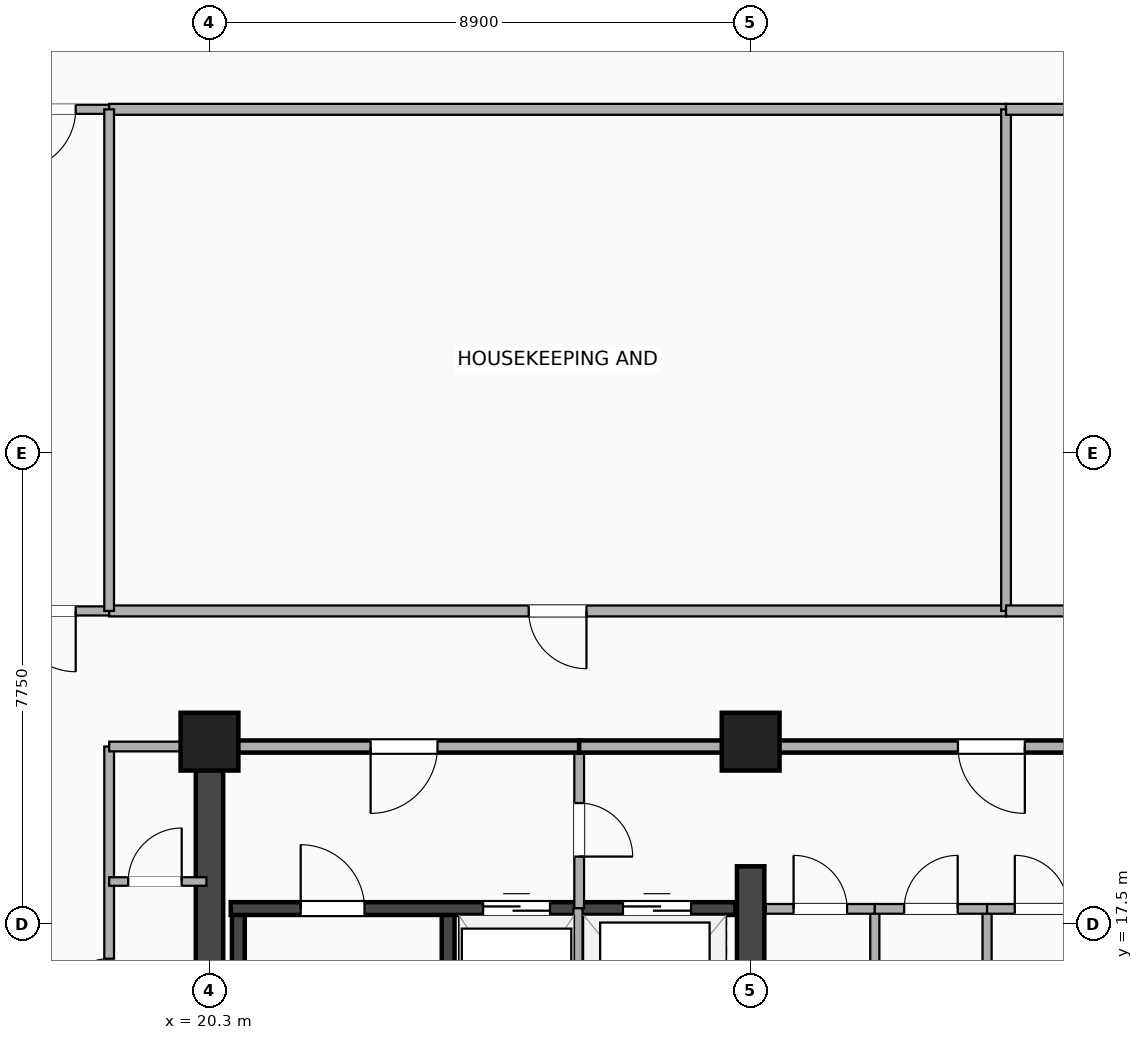
"""IFC4 building model, lengths in metres.
Left out: names, types, materials, properties, quantities, classifications, styles, units other than length and angle.
Written with IfcOpenShell. Run it as: python <this file> out.ifc"""

import sys

from ifc_helpers import new_model, si_unit, direction, frame, frame_2d, origin, origin_2d, place, context, subcontext, project, spatial, rectangle, extrude, element, fill, save


model = new_model("IFC4")
c1 = context("Model", 3, precision=1e-05, world=origin(), true_north=direction((0.0, 1.0)))
c2 = subcontext(c1, "Body", "Model", "MODEL_VIEW")
j1 = project(units=[si_unit("LENGTHUNIT", "METRE"), si_unit("PLANEANGLEUNIT", "RADIAN")], contexts=[c1])
p1 = place(None, origin())
s1 = spatial("IfcSite", under=j1, at=p1, CompositionType="ELEMENT")
p2 = place(p1, origin())
s2 = spatial("IfcBuilding", under=s1, at=p2, CompositionType="ELEMENT")
p3 = place(p2, frame((0.0, 0.0, 224.9)))
s3 = spatial("IfcBuildingStorey", under=s2, at=p3, CompositionType="ELEMENT", Elevation=224.9)
p4 = place(p3, frame((20.3, 3.5, 0.0), z_axis=(0.0, 0.0, 1.0), x_axis=(0.0, 1.0, 0.0)))
e1 = element("IfcWall", 1, at=p4, inside=s3, PredefinedType="SHEAR", context=c2, shape_type="SweptSolid", body=[
    extrude(rectangle(XDim=16.9, YDim=0.45, at=frame_2d((8.45, 0.0))), origin(), (0.0, 0.0, 1.0), 3.26),
])
p5 = place(p3, frame((29.2, 3.5, 0.0), z_axis=(0.0, 0.0, 1.0), x_axis=(0.0, 1.0, 0.0)))
e2 = element("IfcWall", 2, at=p5, inside=s3, PredefinedType="SHEAR", context=c2, shape_type="SweptSolid", body=[
    extrude(rectangle(XDim=14.95, YDim=0.45, at=frame_2d((7.475, 0.0))), origin(), (0.0, 0.0, 1.0), 3.26),
])
p6 = place(p5, frame((7.75, 0.0, 0.0), z_axis=(0.0, 0.0, 1.0), x_axis=(-1.0, 0.0, 0.0)))
e3 = element("IfcOpeningElement", 3, at=p6, cuts=e2, PredefinedType="OPENING", context=c2, shape_type="SweptSolid", body=[
    extrude(rectangle(XDim=1.1, YDim=2.15, at=frame_2d((0.55, 1.075))), frame((0.0, 0.235, 0.0), z_axis=(0.0, -1.0, 0.0), x_axis=(1.0, 0.0, 0.0)), (0.0, 0.0, 1.0), 0.47),
])
for number, where, z_axis, x_axis in (
    (4, (20.775, 9.745, 0.0), (0.0, 0.0, 1.0), (0.0, 1.0, 0.0)),
    (5, (24.225, 9.745, 0.0), (0.0, 0.0, 1.0), (0.0, 1.0, 0.0)),
):
    element("IfcWall", number, at=place(p3, frame(where, z_axis=z_axis, x_axis=x_axis)), inside=s3, PredefinedType="SHEAR", context=c2, shape_type="SweptSolid", body=[
        extrude(rectangle(XDim=8.01, YDim=0.21, at=frame_2d((4.005, 0.0))), origin(), (0.0, 0.0, 1.0), 3.26),
    ])
p7 = place(p3, frame((20.65, 17.755, 0.0), z_axis=(0.0, 0.0, 1.0), x_axis=(1.0, 0.0, 0.0)))
e6 = element("IfcWall", 6, at=p7, inside=s3, PredefinedType="SHEAR", context=c2, shape_type="SweptSolid", body=[
    extrude(rectangle(XDim=8.3, YDim=0.21, at=frame_2d((4.15, 0.0))), origin(), (0.0, 0.0, 1.0), 3.26),
])
p8 = place(p7, frame((2.2, 0.0, 0.0), z_axis=(0.0, 0.0, 1.0), x_axis=(-1.0, 0.0, 0.0)))
e7 = element("IfcOpeningElement", 7, at=p8, cuts=e6, PredefinedType="OPENING", context=c2, shape_type="SweptSolid", body=[
    extrude(rectangle(XDim=1.05, YDim=2.15, at=frame_2d((0.525, 1.075))), frame((0.0, 0.115, 0.0), z_axis=(0.0, -1.0, 0.0), x_axis=(1.0, 0.0, 0.0)), (0.0, 0.0, 1.0), 0.23),
])
p9 = place(p7, frame((4.15, 0.0, 0.0)))
e8 = element("IfcOpeningElement", 8, at=p9, cuts=e6, PredefinedType="OPENING", context=c2, shape_type="SweptSolid", body=[
    extrude(rectangle(XDim=1.1, YDim=2.18, at=frame_2d((0.55, 1.09))), frame((0.0, 0.115, 0.0), z_axis=(0.0, -1.0, 0.0), x_axis=(1.0, 0.0, 0.0)), (0.0, 0.0, 1.0), 0.23),
])
p10 = place(p7, frame((6.45, 0.0, 0.0)))
e9 = element("IfcOpeningElement", 9, at=p10, cuts=e6, PredefinedType="OPENING", context=c2, shape_type="SweptSolid", body=[
    extrude(rectangle(XDim=1.12, YDim=2.2, at=frame_2d((0.56, 1.1))), frame((0.0, 0.115, 0.0), z_axis=(0.0, -1.0, 0.0), x_axis=(1.0, 0.0, 0.0)), (0.0, 0.0, 1.0), 0.23),
])
for number, where, z_axis, x_axis in (
    (10, (20.3, 20.5, -0.24), (0.0, 0.0, 1.0), (1.0, 0.0, 0.0)),
    (11, (29.2, 20.5, -0.24), (0.0, 0.0, 1.0), (1.0, 0.0, 0.0)),
):
    element("IfcColumn", number, at=place(p3, frame(where, z_axis=z_axis, x_axis=x_axis)), inside=s3, PredefinedType="COLUMN", context=c2, shape_type="SweptSolid", body=[
        extrude(rectangle(XDim=0.95, YDim=0.95, at=origin_2d()), origin(), (0.0, 0.0, 1.0), 3.5),
    ])
p11 = place(p3, frame((26.38, 17.76, 0.0), z_axis=(0.0, 0.0, 1.0), x_axis=(0.0, 1.0, 0.0)))
e12 = element("IfcWall", 12, at=p11, inside=s3, PredefinedType="PARTITIONING", context=c2, shape_type="SweptSolid", body=[
    extrude(rectangle(XDim=2.66, YDim=0.16, at=frame_2d((1.33, 0.0))), origin(), (0.0, 0.0, 1.0), 2.706),
])
p12 = place(p11, frame((0.85, 0.0, 0.0)))
e13 = element("IfcOpeningElement", 13, at=p12, cuts=e12, PredefinedType="OPENING", context=c2, shape_type="SweptSolid", body=[
    extrude(rectangle(XDim=0.88, YDim=2.08, at=frame_2d((0.44, 1.04))), frame((0.0, 0.09, 0.0), z_axis=(0.0, -1.0, 0.0), x_axis=(1.0, 0.0, 0.0)), (0.0, 0.0, 1.0), 0.18),
])
p13 = place(p3, frame((26.36, 14.72, 0.0), z_axis=(0.0, 0.0, 1.0), x_axis=(0.0, 1.0, 0.0)))
e14 = element("IfcWall", 14, at=p13, inside=s3, PredefinedType="PARTITIONING", context=c2, shape_type="SweptSolid", body=[
    extrude(rectangle(XDim=3.04, YDim=0.15, at=frame_2d((1.52, 0.0))), origin(), (0.0, 0.0, 1.0), 3.26),
])
p14 = place(p3, frame((20.65, 20.42, 0.0), z_axis=(0.0, 0.0, 1.0), x_axis=(1.0, 0.0, 0.0)))
e15 = element("IfcWall", 15, at=p14, inside=s3, PredefinedType="PARTITIONING", context=c2, shape_type="SweptSolid", body=[
    extrude(rectangle(XDim=5.73, YDim=0.2, at=frame_2d((2.865, 0.0))), origin(), (0.0, 0.0, 1.0), 2.472),
])
p15 = place(p14, frame((2.3, 0.0, 0.0)))
e16 = element("IfcOpeningElement", 16, at=p15, cuts=e15, PredefinedType="OPENING", context=c2, shape_type="SweptSolid", body=[
    extrude(rectangle(XDim=1.1, YDim=2.15, at=frame_2d((0.55, 1.075))), frame((0.0, 0.11, 0.0), z_axis=(0.0, -1.0, 0.0), x_axis=(1.0, 0.0, 0.0)), (0.0, 0.0, 1.0), 0.22),
])
p16 = place(p3, frame((26.38, 20.42, 0.0), z_axis=(0.0, 0.0, 1.0), x_axis=(1.0, 0.0, 0.0)))
e17 = element("IfcWall", 17, at=p16, inside=s3, PredefinedType="PARTITIONING", context=c2, shape_type="SweptSolid", body=[
    extrude(rectangle(XDim=2.82, YDim=0.2, at=frame_2d((1.41, 0.0))), origin(), (0.0, 0.0, 1.0), 2.472),
])
p17 = place(p3, frame((29.2, 20.42, 0.0), z_axis=(0.0, 0.0, 1.0), x_axis=(1.0, 0.0, 0.0)))
e18 = element("IfcWall", 18, at=p17, inside=s3, PredefinedType="PARTITIONING", context=c2, shape_type="SweptSolid", body=[
    extrude(rectangle(XDim=7.8, YDim=0.2, at=frame_2d((3.9, 0.0))), origin(), (0.0, 0.0, 1.0), 2.472),
])
p18 = place(p17, frame((3.409, 0.0, 0.0)))
e19 = element("IfcOpeningElement", 19, at=p18, cuts=e18, PredefinedType="OPENING", context=c2, shape_type="SweptSolid", body=[
    extrude(rectangle(XDim=1.1, YDim=2.15, at=frame_2d((0.55, 1.075))), frame((0.0, 0.11, 0.0), z_axis=(0.0, -1.0, 0.0), x_axis=(1.0, 0.0, 0.0)), (0.0, 0.0, 1.0), 0.22),
])
p19 = place(p3, frame((31.242, 11.74, 0.0), z_axis=(0.0, 0.0, 1.0), x_axis=(0.0, 1.0, 0.0)))
e20 = element("IfcWall", 20, at=p19, inside=s3, PredefinedType="PARTITIONING", context=c2, shape_type="SweptSolid", body=[
    extrude(rectangle(XDim=6.01, YDim=0.15, at=frame_2d((3.005, 0.0))), origin(), (0.0, 0.0, 1.0), 3.26),
])
p20 = place(p3, frame((29.45, 17.75, 0.0), z_axis=(0.0, 0.0, 1.0), x_axis=(1.0, 0.0, 0.0)))
e21 = element("IfcWall", 21, at=p20, inside=s3, PredefinedType="PARTITIONING", context=c2, shape_type="SweptSolid", body=[
    extrude(rectangle(XDim=1.792, YDim=0.16, at=frame_2d((0.896, 0.0))), origin(), (0.0, 0.0, 1.0), 3.26),
])
p21 = place(p20, frame((1.336, 0.0, 0.0), z_axis=(0.0, 0.0, 1.0), x_axis=(-1.0, 0.0, 0.0)))
e22 = element("IfcOpeningElement", 22, at=p21, cuts=e21, PredefinedType="OPENING", context=c2, shape_type="SweptSolid", body=[
    extrude(rectangle(XDim=0.88, YDim=2.08, at=frame_2d((0.44, 1.04))), frame((0.0, 0.09, 0.0), z_axis=(0.0, -1.0, 0.0), x_axis=(1.0, 0.0, 0.0)), (0.0, 0.0, 1.0), 0.18),
])
p22 = place(p3, frame((33.088, 11.74, 0.0), z_axis=(0.0, 0.0, 1.0), x_axis=(0.0, 1.0, 0.0)))
e23 = element("IfcWall", 23, at=p22, inside=s3, PredefinedType="PARTITIONING", context=c2, shape_type="SweptSolid", body=[
    extrude(rectangle(XDim=6.01, YDim=0.15, at=frame_2d((3.005, 0.0))), origin(), (0.0, 0.0, 1.0), 3.26),
])
p23 = place(p3, frame((31.242, 17.75, 0.0), z_axis=(0.0, 0.0, 1.0), x_axis=(1.0, 0.0, 0.0)))
e24 = element("IfcWall", 24, at=p23, inside=s3, PredefinedType="PARTITIONING", context=c2, shape_type="SweptSolid", body=[
    extrude(rectangle(XDim=1.846, YDim=0.16, at=frame_2d((0.923, 0.0))), origin(), (0.0, 0.0, 1.0), 3.26),
])
p24 = place(p23, frame((1.363, 0.0, 0.0), z_axis=(0.0, 0.0, 1.0), x_axis=(-1.0, 0.0, 0.0)))
e25 = element("IfcOpeningElement", 25, at=p24, cuts=e24, PredefinedType="OPENING", context=c2, shape_type="SweptSolid", body=[
    extrude(rectangle(XDim=0.88, YDim=2.08, at=frame_2d((0.44, 1.04))), frame((0.0, 0.09, 0.0), z_axis=(0.0, -1.0, 0.0), x_axis=(1.0, 0.0, 0.0)), (0.0, 0.0, 1.0), 0.18),
])
p25 = place(p3, frame((33.088, 17.75, 0.0), z_axis=(0.0, 0.0, 1.0), x_axis=(1.0, 0.0, 0.0)))
e26 = element("IfcWall", 26, at=p25, inside=s3, PredefinedType="PARTITIONING", context=c2, shape_type="SweptSolid", body=[
    extrude(rectangle(XDim=1.792, YDim=0.16, at=frame_2d((0.896, 0.0))), origin(), (0.0, 0.0, 1.0), 3.26),
])
p26 = place(p25, frame((1.336, 0.0, 0.0), z_axis=(0.0, 0.0, 1.0), x_axis=(-1.0, 0.0, 0.0)))
e27 = element("IfcOpeningElement", 27, at=p26, cuts=e26, PredefinedType="OPENING", context=c2, shape_type="SweptSolid", body=[
    extrude(rectangle(XDim=0.88, YDim=2.08, at=frame_2d((0.44, 1.04))), frame((0.0, 0.09, 0.0), z_axis=(0.0, -1.0, 0.0), x_axis=(1.0, 0.0, 0.0)), (0.0, 0.0, 1.0), 0.18),
])
p27 = place(p3, frame((18.65, 15.65, 0.0), z_axis=(0.0, 0.0, 1.0), x_axis=(0.0, 1.0, 0.0)))
e28 = element("IfcWall", 28, at=p27, inside=s3, PredefinedType="PARTITIONING", context=c2, shape_type="SweptSolid", body=[
    extrude(rectangle(XDim=4.77, YDim=0.16, at=frame_2d((2.385, 0.0))), origin(), (0.0, 0.0, 1.0), 2.472),
])
p28 = place(p27, frame((1.28, 0.0, 0.0), z_axis=(0.0, 0.0, 1.0), x_axis=(-1.0, 0.0, 0.0)))
e29 = element("IfcOpeningElement", 29, at=p28, cuts=e28, PredefinedType="OPENING", context=c2, shape_type="SweptSolid", body=[
    extrude(rectangle(XDim=0.88, YDim=2.08, at=frame_2d((0.44, 1.04))), frame((0.0, 0.09, 0.0), z_axis=(0.0, -1.0, 0.0), x_axis=(1.0, 0.0, 0.0)), (0.0, 0.0, 1.0), 0.18),
])
p29 = place(p3, frame((18.65, 20.42, 0.0), z_axis=(0.0, 0.0, 1.0), x_axis=(1.0, 0.0, 0.0)))
e30 = element("IfcWall", 30, at=p29, inside=s3, PredefinedType="PARTITIONING", context=c2, shape_type="SweptSolid", body=[
    extrude(rectangle(XDim=1.65, YDim=0.16, at=frame_2d((0.825, 0.0))), origin(), (0.0, 0.0, 1.0), 2.472),
])
p30 = place(p3, frame((16.65, 22.65, 0.0), z_axis=(0.0, 0.0, 1.0), x_axis=(1.0, 0.0, 0.0)))
e31 = element("IfcWall", 31, at=p30, inside=s3, PredefinedType="PARTITIONING", context=c2, shape_type="SweptSolid", body=[
    extrude(rectangle(XDim=2.0, YDim=0.15, at=frame_2d((1.0, 0.0))), origin(), (0.0, 0.0, 1.0), 3.26),
])
p31 = place(p30, frame((0.45, 0.0, 0.0)))
e32 = element("IfcOpeningElement", 32, at=p31, cuts=e31, PredefinedType="OPENING", context=c2, shape_type="SweptSolid", body=[
    extrude(rectangle(XDim=1.0, YDim=2.15, at=frame_2d((0.5, 1.075))), frame((0.0, 0.085, 0.0), z_axis=(0.0, -1.0, 0.0), x_axis=(1.0, 0.0, 0.0)), (0.0, 0.0, 1.0), 0.17),
])
p32 = place(p3, frame((16.65, 30.9, 0.0), z_axis=(0.0, 0.0, 1.0), x_axis=(1.0, 0.0, 0.0)))
e33 = element("IfcWall", 33, at=p32, inside=s3, PredefinedType="PARTITIONING", context=c2, shape_type="SweptSolid", body=[
    extrude(rectangle(XDim=2.0, YDim=0.15, at=frame_2d((1.0, 0.0))), origin(), (0.0, 0.0, 1.0), 3.26),
])
p33 = place(p32, frame((0.45, 0.0, 0.0)))
e34 = element("IfcOpeningElement", 34, at=p33, cuts=e33, PredefinedType="OPENING", context=c2, shape_type="SweptSolid", body=[
    extrude(rectangle(XDim=1.0, YDim=2.15, at=frame_2d((0.5, 1.075))), frame((0.0, 0.085, 0.0), z_axis=(0.0, -1.0, 0.0), x_axis=(1.0, 0.0, 0.0)), (0.0, 0.0, 1.0), 0.17),
])
p34 = place(p3, frame((18.65, 22.65, 0.0), z_axis=(0.0, 0.0, 1.0), x_axis=(1.0, 0.0, 0.0)))
e35 = element("IfcWall", 35, at=p34, inside=s3, PredefinedType="PARTITIONING", context=c2, shape_type="SweptSolid", body=[
    extrude(rectangle(XDim=14.75, YDim=0.18, at=frame_2d((7.375, 0.0))), origin(), (0.0, 0.0, 1.0), 2.472),
])
p35 = place(p34, frame((6.9, 0.0, 0.0)))
e36 = element("IfcOpeningElement", 36, at=p35, cuts=e35, PredefinedType="OPENING", context=c2, shape_type="SweptSolid", body=[
    extrude(rectangle(XDim=0.95, YDim=2.15, at=frame_2d((0.475, 1.075))), frame((0.0, 0.1, 0.0), z_axis=(0.0, -1.0, 0.0), x_axis=(1.0, 0.0, 0.0)), (0.0, 0.0, 1.0), 0.2),
])
p36 = place(p3, frame((18.65, 30.9, 0.0), z_axis=(0.0, 0.0, 1.0), x_axis=(1.0, 0.0, 0.0)))
e37 = element("IfcWall", 37, at=p36, inside=s3, PredefinedType="PARTITIONING", context=c2, shape_type="SweptSolid", body=[
    extrude(rectangle(XDim=14.75, YDim=0.18, at=frame_2d((7.375, 0.0))), origin(), (0.0, 0.0, 1.0), 2.472),
])
for number, where, z_axis, x_axis in (
    (38, (18.65, 22.65, 0.0), (0.0, 0.0, 1.0), (0.0, 1.0, 0.0)),
    (39, (33.4, 22.65, 0.0), (0.0, 0.0, 1.0), (0.0, 1.0, 0.0)),
):
    element("IfcWall", number, at=place(p3, frame(where, z_axis=z_axis, x_axis=x_axis)), inside=s3, PredefinedType="PARTITIONING", context=c2, shape_type="SweptSolid", body=[
        extrude(rectangle(XDim=8.25, YDim=0.16, at=frame_2d((4.125, 0.0))), origin(), (0.0, 0.0, 1.0), 2.887),
    ])
p37 = place(p3, frame((33.4, 22.65, 0.0), z_axis=(0.0, 0.0, 1.0), x_axis=(1.0, 0.0, 0.0)))
e40 = element("IfcWall", 40, at=p37, inside=s3, PredefinedType="PARTITIONING", context=c2, shape_type="SweptSolid", body=[
    extrude(rectangle(XDim=5.7, YDim=0.18, at=frame_2d((2.85, 0.0))), origin(), (0.0, 0.0, 1.0), 2.472),
])
p38 = place(p37, frame((2.375, 0.0, 0.0)))
e41 = element("IfcOpeningElement", 41, at=p38, cuts=e40, PredefinedType="OPENING", context=c2, shape_type="SweptSolid", body=[
    extrude(rectangle(XDim=0.95, YDim=2.15, at=frame_2d((0.475, 1.075))), frame((0.0, 0.1, 0.0), z_axis=(0.0, -1.0, 0.0), x_axis=(1.0, 0.0, 0.0)), (0.0, 0.0, 1.0), 0.2),
])
p39 = place(p3, frame((33.4, 30.9, 0.0), z_axis=(0.0, 0.0, 1.0), x_axis=(1.0, 0.0, 0.0)))
e42 = element("IfcWall", 42, at=p39, inside=s3, PredefinedType="PARTITIONING", context=c2, shape_type="SweptSolid", body=[
    extrude(rectangle(XDim=5.7, YDim=0.18, at=frame_2d((2.85, 0.0))), origin(), (0.0, 0.0, 1.0), 2.472),
])
p40 = place(p3, frame((18.65, 18.2, 0.0), z_axis=(0.0, 0.0, 1.0), x_axis=(1.0, 0.0, 0.0)))
e43 = element("IfcWall", 43, at=p40, inside=s3, PredefinedType="PARTITIONING", context=c2, shape_type="SweptSolid", body=[
    extrude(rectangle(XDim=1.6, YDim=0.14, at=frame_2d((0.8, 0.0))), origin(), (0.0, 0.0, 1.0), 2.472),
])
p41 = place(p40, frame((1.193, 0.0, 0.0), z_axis=(0.0, 0.0, 1.0), x_axis=(-1.0, 0.0, 0.0)))
e44 = element("IfcOpeningElement", 44, at=p41, cuts=e43, PredefinedType="OPENING", context=c2, shape_type="SweptSolid", body=[
    extrude(rectangle(XDim=0.88, YDim=2.08, at=frame_2d((0.44, 1.04))), frame((0.0, 0.08, 0.0), z_axis=(0.0, -1.0, 0.0), x_axis=(1.0, 0.0, 0.0)), (0.0, 0.0, 1.0), 0.16),
])
p42 = place(p8, origin())
e45 = element("IfcDoor", 45, at=p42, inside=s3, OperationType="SINGLE_SWING_LEFT", PredefinedType="DOOR", context=c2, shape_type="SweptSolid", body=[
    extrude(rectangle(XDim=1.05, YDim=2.15, at=frame_2d((0.525, 1.075))), frame((0.0, 0.025, 0.0), z_axis=(0.0, -1.0, 0.0), x_axis=(1.0, 0.0, 0.0)), (0.0, 0.0, 1.0), 0.05),
])
fill(e7, e45)
p43 = place(p9, origin())
e46 = element("IfcDoor", 46, at=p43, inside=s3, OperationType="DOUBLE_DOOR_SLIDING", PredefinedType="DOOR", context=c2, shape_type="SweptSolid", body=[
    extrude(rectangle(XDim=1.1, YDim=2.18, at=frame_2d((0.55, 1.09))), frame((0.0, 0.025, 0.0), z_axis=(0.0, -1.0, 0.0), x_axis=(1.0, 0.0, 0.0)), (0.0, 0.0, 1.0), 0.05),
])
fill(e8, e46)
p44 = place(p10, origin())
e47 = element("IfcDoor", 47, at=p44, inside=s3, OperationType="DOUBLE_DOOR_SLIDING", PredefinedType="DOOR", context=c2, shape_type="SweptSolid", body=[
    extrude(rectangle(XDim=1.12, YDim=2.2, at=frame_2d((0.56, 1.1))), frame((0.0, 0.025, 0.0), z_axis=(0.0, -1.0, 0.0), x_axis=(1.0, 0.0, 0.0)), (0.0, 0.0, 1.0), 0.05),
])
fill(e9, e47)
p45 = place(p12, origin())
e48 = element("IfcDoor", 48, at=p45, inside=s3, OperationType="SINGLE_SWING_LEFT", PredefinedType="DOOR", context=c2, shape_type="SweptSolid", body=[
    extrude(rectangle(XDim=0.88, YDim=2.08, at=frame_2d((0.44, 1.04))), frame((0.0, 0.025, 0.0), z_axis=(0.0, -1.0, 0.0), x_axis=(1.0, 0.0, 0.0)), (0.0, 0.0, 1.0), 0.05),
])
fill(e13, e48)
p46 = place(p15, origin())
e49 = element("IfcDoor", 49, at=p46, inside=s3, OperationType="SINGLE_SWING_LEFT", PredefinedType="DOOR", context=c2, shape_type="SweptSolid", body=[
    extrude(rectangle(XDim=1.1, YDim=2.15, at=frame_2d((0.55, 1.075))), frame((0.0, 0.025, 0.0), z_axis=(0.0, -1.0, 0.0), x_axis=(1.0, 0.0, 0.0)), (0.0, 0.0, 1.0), 0.05),
])
fill(e16, e49)
p47 = place(p18, origin())
e50 = element("IfcDoor", 50, at=p47, inside=s3, OperationType="SINGLE_SWING_RIGHT", PredefinedType="DOOR", context=c2, shape_type="SweptSolid", body=[
    extrude(rectangle(XDim=1.1, YDim=2.15, at=frame_2d((0.55, 1.075))), frame((0.0, 0.025, 0.0), z_axis=(0.0, -1.0, 0.0), x_axis=(1.0, 0.0, 0.0)), (0.0, 0.0, 1.0), 0.05),
])
fill(e19, e50)
p48 = place(p21, origin())
e51 = element("IfcDoor", 51, at=p48, inside=s3, OperationType="SINGLE_SWING_LEFT", PredefinedType="DOOR", context=c2, shape_type="SweptSolid", body=[
    extrude(rectangle(XDim=0.88, YDim=2.08, at=frame_2d((0.44, 1.04))), frame((0.0, 0.025, 0.0), z_axis=(0.0, -1.0, 0.0), x_axis=(1.0, 0.0, 0.0)), (0.0, 0.0, 1.0), 0.05),
])
fill(e22, e51)
p49 = place(p24, origin())
e52 = element("IfcDoor", 52, at=p49, inside=s3, OperationType="SINGLE_SWING_RIGHT", PredefinedType="DOOR", context=c2, shape_type="SweptSolid", body=[
    extrude(rectangle(XDim=0.88, YDim=2.08, at=frame_2d((0.44, 1.04))), frame((0.0, 0.025, 0.0), z_axis=(0.0, -1.0, 0.0), x_axis=(1.0, 0.0, 0.0)), (0.0, 0.0, 1.0), 0.05),
])
fill(e25, e52)
p50 = place(p26, origin())
e53 = element("IfcDoor", 53, at=p50, inside=s3, OperationType="SINGLE_SWING_LEFT", PredefinedType="DOOR", context=c2, shape_type="SweptSolid", body=[
    extrude(rectangle(XDim=0.88, YDim=2.08, at=frame_2d((0.44, 1.04))), frame((0.0, 0.025, 0.0), z_axis=(0.0, -1.0, 0.0), x_axis=(1.0, 0.0, 0.0)), (0.0, 0.0, 1.0), 0.05),
])
fill(e27, e53)
p51 = place(p28, origin())
e54 = element("IfcDoor", 54, at=p51, inside=s3, OperationType="SINGLE_SWING_LEFT", PredefinedType="DOOR", context=c2, shape_type="SweptSolid", body=[
    extrude(rectangle(XDim=0.88, YDim=2.08, at=frame_2d((0.44, 1.04))), frame((0.0, 0.025, 0.0), z_axis=(0.0, -1.0, 0.0), x_axis=(1.0, 0.0, 0.0)), (0.0, 0.0, 1.0), 0.05),
])
fill(e29, e54)
p52 = place(p31, origin())
e55 = element("IfcDoor", 55, at=p52, inside=s3, OperationType="SINGLE_SWING_RIGHT", PredefinedType="DOOR", context=c2, shape_type="SweptSolid", body=[
    extrude(rectangle(XDim=1.0, YDim=2.15, at=frame_2d((0.5, 1.075))), frame((0.0, 0.025, 0.0), z_axis=(0.0, -1.0, 0.0), x_axis=(1.0, 0.0, 0.0)), (0.0, 0.0, 1.0), 0.05),
])
fill(e32, e55)
p53 = place(p33, origin())
e56 = element("IfcDoor", 56, at=p53, inside=s3, OperationType="SINGLE_SWING_LEFT", PredefinedType="DOOR", context=c2, shape_type="SweptSolid", body=[
    extrude(rectangle(XDim=1.0, YDim=2.15, at=frame_2d((0.5, 1.075))), frame((0.0, 0.025, 0.0), z_axis=(0.0, -1.0, 0.0), x_axis=(1.0, 0.0, 0.0)), (0.0, 0.0, 1.0), 0.05),
])
fill(e34, e56)
p54 = place(p35, origin())
e57 = element("IfcDoor", 57, at=p54, inside=s3, OperationType="SINGLE_SWING_RIGHT", PredefinedType="DOOR", context=c2, shape_type="SweptSolid", body=[
    extrude(rectangle(XDim=0.95, YDim=2.15, at=frame_2d((0.475, 1.075))), frame((0.0, 0.025, 0.0), z_axis=(0.0, -1.0, 0.0), x_axis=(1.0, 0.0, 0.0)), (0.0, 0.0, 1.0), 0.05),
])
fill(e36, e57)
p55 = place(p41, origin())
e58 = element("IfcDoor", 58, at=p55, inside=s3, OperationType="SINGLE_SWING_RIGHT", PredefinedType="DOOR", context=c2, shape_type="SweptSolid", body=[
    extrude(rectangle(XDim=0.88, YDim=2.08, at=frame_2d((0.44, 1.04))), frame((0.0, 0.025, 0.0), z_axis=(0.0, -1.0, 0.0), x_axis=(1.0, 0.0, 0.0)), (0.0, 0.0, 1.0), 0.05),
])
fill(e44, e58)
save(model, sys.argv[1])
